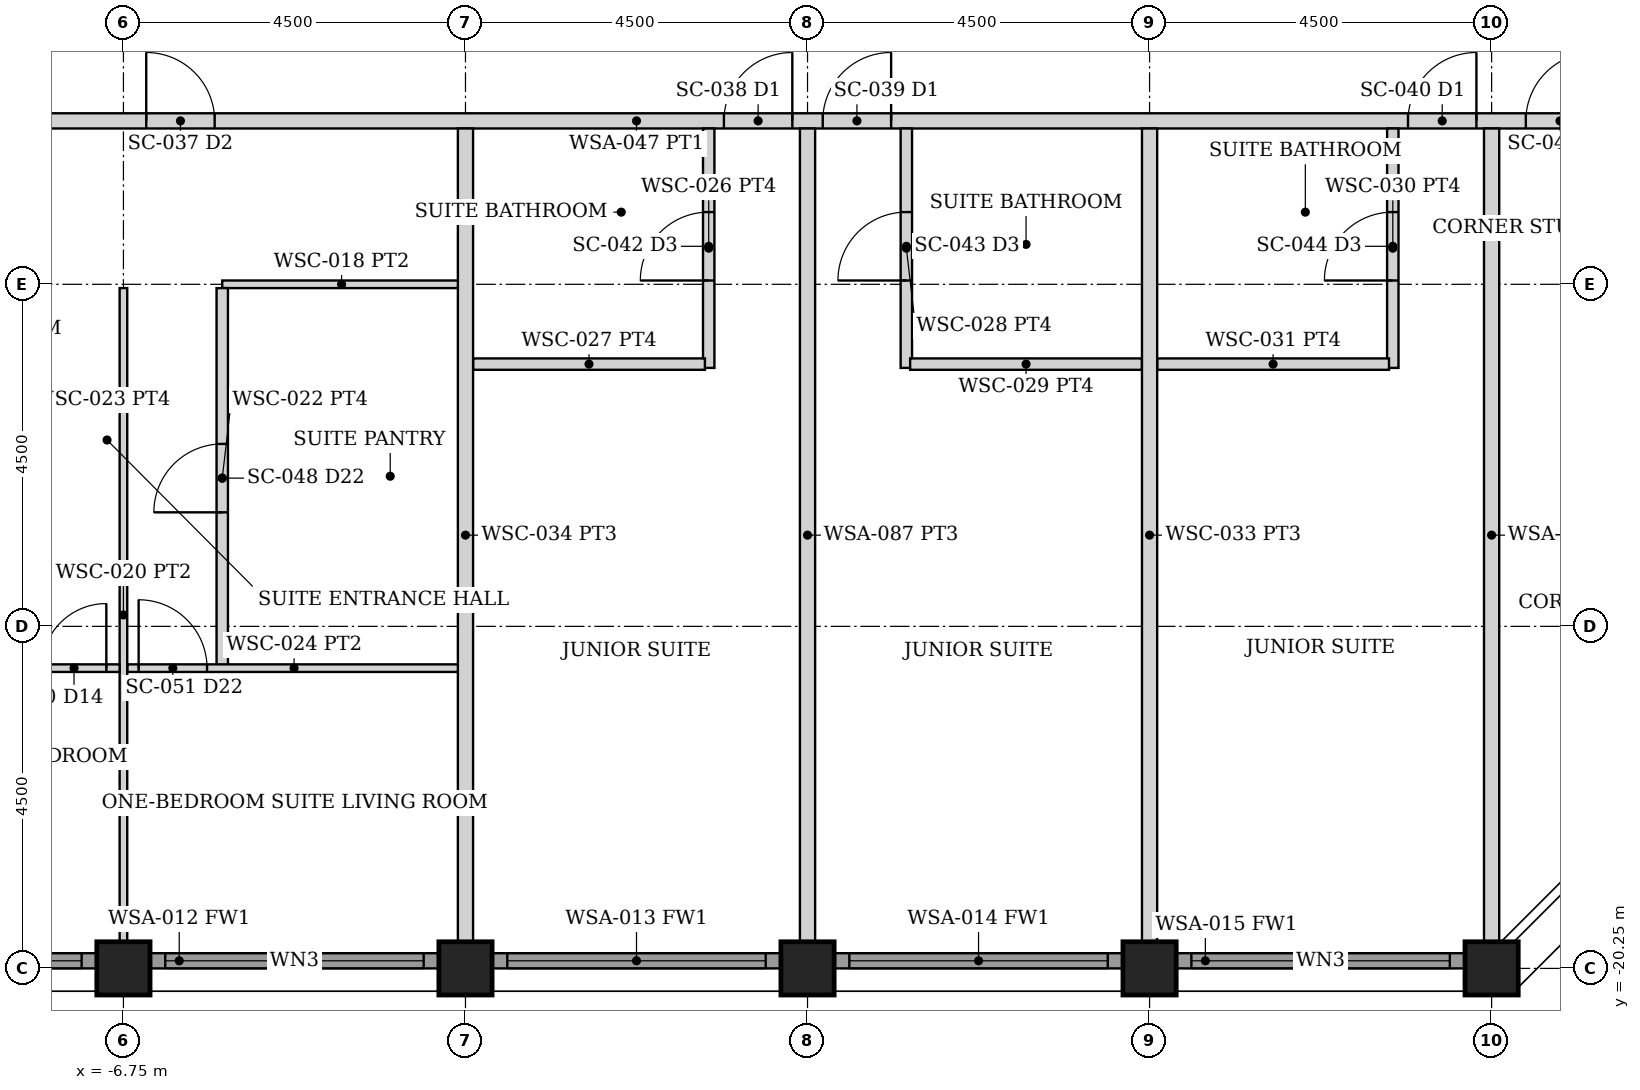
"""IFC4 building model, lengths in metres.
Left out: names, types, materials, properties, quantities, classifications, styles, units other than length and angle.
Written with IfcOpenShell. Run it as: python <this file> out.ifc"""

import sys

from ifc_helpers import new_model, si_unit, direction, frame, frame_2d, origin, origin_2d, place, context, subcontext, project, spatial, rectangle, hollow_rectangle, extrude, element, fill, save


model = new_model("IFC4")
c1 = context("Model", 3, precision=1e-05, world=origin(), true_north=direction((0.0, 1.0)))
c2 = subcontext(c1, "Body", "Model", "MODEL_VIEW")
j1 = project(units=[si_unit("LENGTHUNIT", "METRE"), si_unit("PLANEANGLEUNIT", "RADIAN")], contexts=[c1])
p1 = place(None, origin())
s1 = spatial("IfcSite", under=j1, at=p1, CompositionType="ELEMENT")
p2 = place(p1, origin())
s2 = spatial("IfcBuilding", under=s1, at=p2, CompositionType="ELEMENT")
p3 = place(p2, frame((0.0, 0.0, 223.3)))
s3 = spatial("IfcBuildingStorey", under=s2, at=p3, CompositionType="ELEMENT", Elevation=223.3)
for number, where, z_axis, x_axis in (
    (1, (-6.75, -20.25, 0.0), (0.0, 0.0, 1.0), (0.0, 1.0, 0.0)),
    (2, (-2.25, -20.25, 0.0), (0.0, 0.0, 1.0), (0.0, 1.0, 0.0)),
    (3, (2.25, -20.25, 0.0), (0.0, 0.0, 1.0), (0.0, 1.0, 0.0)),
    (4, (6.75, -20.25, 0.0), (0.0, 0.0, 1.0), (0.0, 1.0, 0.0)),
    (5, (11.25, -20.25, 0.0), (0.0, 0.0, 1.0), (0.0, 1.0, 0.0)),
):
    element("IfcColumn", number, at=place(p3, frame(where, z_axis=z_axis, x_axis=x_axis)), inside=s3, PredefinedType="COLUMN", context=c2, shape_type="SweptSolid", body=[
        extrude(hollow_rectangle(XDim=0.7, YDim=0.7, WallThickness=0.04, at=origin_2d()), origin(), (0.0, 0.0, 1.0), 3.75),
    ])
p4 = place(p3, frame((-10.895, -20.15, 0.0), z_axis=(0.0, 0.0, 1.0), x_axis=(1.0, 0.0, 0.0)))
e6 = element("IfcWall", 6, at=p4, inside=s3, PredefinedType="SOLIDWALL", context=c2, shape_type="SweptSolid", body=[
    extrude(rectangle(XDim=3.79, YDim=0.2, at=frame_2d((1.895, 0.0))), origin(), (0.0, 0.0, 1.0), 2.629),
])
p5 = place(p4, frame((0.195, 0.0, 0.3)))
e7 = element("IfcOpeningElement", 7, at=p5, cuts=e6, PredefinedType="OPENING", context=c2, shape_type="SweptSolid", body=[
    extrude(rectangle(XDim=3.4, YDim=2.179, at=frame_2d((1.7, 1.089))), frame((0.0, 0.11, 0.0), z_axis=(0.0, -1.0, 0.0), x_axis=(1.0, 0.0, 0.0)), (0.0, 0.0, 1.0), 0.22),
])
p6 = place(p3, frame((-6.395, -20.15, 0.0), z_axis=(0.0, 0.0, 1.0), x_axis=(1.0, 0.0, 0.0)))
e8 = element("IfcWall", 8, at=p6, inside=s3, PredefinedType="SOLIDWALL", context=c2, shape_type="SweptSolid", body=[
    extrude(rectangle(XDim=3.79, YDim=0.2, at=frame_2d((1.895, 0.0))), origin(), (0.0, 0.0, 1.0), 2.629),
])
p7 = place(p6, frame((0.195, 0.0, 0.3)))
e9 = element("IfcOpeningElement", 9, at=p7, cuts=e8, PredefinedType="OPENING", context=c2, shape_type="SweptSolid", body=[
    extrude(rectangle(XDim=3.4, YDim=2.179, at=frame_2d((1.7, 1.089))), frame((0.0, 0.11, 0.0), z_axis=(0.0, -1.0, 0.0), x_axis=(1.0, 0.0, 0.0)), (0.0, 0.0, 1.0), 0.22),
])
p8 = place(p3, frame((-1.895, -20.15, 0.0), z_axis=(0.0, 0.0, 1.0), x_axis=(1.0, 0.0, 0.0)))
e10 = element("IfcWall", 10, at=p8, inside=s3, PredefinedType="SOLIDWALL", context=c2, shape_type="SweptSolid", body=[
    extrude(rectangle(XDim=3.79, YDim=0.2, at=frame_2d((1.895, 0.0))), origin(), (0.0, 0.0, 1.0), 2.629),
])
p9 = place(p8, frame((0.195, 0.0, 0.3)))
e11 = element("IfcOpeningElement", 11, at=p9, cuts=e10, PredefinedType="OPENING", context=c2, shape_type="SweptSolid", body=[
    extrude(rectangle(XDim=3.4, YDim=2.179, at=frame_2d((1.7, 1.089))), frame((0.0, 0.11, 0.0), z_axis=(0.0, -1.0, 0.0), x_axis=(1.0, 0.0, 0.0)), (0.0, 0.0, 1.0), 0.22),
])
p10 = place(p3, frame((2.605, -20.15, 0.0), z_axis=(0.0, 0.0, 1.0), x_axis=(1.0, 0.0, 0.0)))
e12 = element("IfcWall", 12, at=p10, inside=s3, PredefinedType="SOLIDWALL", context=c2, shape_type="SweptSolid", body=[
    extrude(rectangle(XDim=3.79, YDim=0.2, at=frame_2d((1.895, 0.0))), origin(), (0.0, 0.0, 1.0), 2.629),
])
p11 = place(p10, frame((0.195, 0.0, 0.3)))
e13 = element("IfcOpeningElement", 13, at=p11, cuts=e12, PredefinedType="OPENING", context=c2, shape_type="SweptSolid", body=[
    extrude(rectangle(XDim=3.4, YDim=2.179, at=frame_2d((1.7, 1.089))), frame((0.0, 0.11, 0.0), z_axis=(0.0, -1.0, 0.0), x_axis=(1.0, 0.0, 0.0)), (0.0, 0.0, 1.0), 0.22),
])
p12 = place(p3, frame((7.105, -20.15, 0.0), z_axis=(0.0, 0.0, 1.0), x_axis=(1.0, 0.0, 0.0)))
e14 = element("IfcWall", 14, at=p12, inside=s3, PredefinedType="SOLIDWALL", context=c2, shape_type="SweptSolid", body=[
    extrude(rectangle(XDim=3.79, YDim=0.2, at=frame_2d((1.895, 0.0))), origin(), (0.0, 0.0, 1.0), 2.629),
])
p13 = place(p12, frame((0.195, 0.0, 0.3)))
e15 = element("IfcOpeningElement", 15, at=p13, cuts=e14, PredefinedType="OPENING", context=c2, shape_type="SweptSolid", body=[
    extrude(rectangle(XDim=3.4, YDim=2.179, at=frame_2d((1.7, 1.089))), frame((0.0, 0.11, 0.0), z_axis=(0.0, -1.0, 0.0), x_axis=(1.0, 0.0, 0.0)), (0.0, 0.0, 1.0), 0.22),
])
p14 = place(p3, frame((-20.05, -9.1, 0.0), z_axis=(0.0, 0.0, 1.0), x_axis=(1.0, 0.0, 0.0)))
e16 = element("IfcWall", 16, at=p14, inside=s3, PredefinedType="PARTITIONING", context=c2, shape_type="SweptSolid", body=[
    extrude(rectangle(XDim=40.1, YDim=0.2, at=frame_2d((20.05, 0.0))), origin(), (0.0, 0.0, 1.0), 2.629),
])
p15 = place(p14, frame((13.6, 0.0, 0.0)))
e17 = element("IfcOpeningElement", 17, at=p15, cuts=e16, PredefinedType="OPENING", context=c2, shape_type="SweptSolid", body=[
    extrude(rectangle(XDim=0.9, YDim=2.1, at=frame_2d((0.45, 1.05))), frame((0.0, 0.11, 0.0), z_axis=(0.0, -1.0, 0.0), x_axis=(1.0, 0.0, 0.0)), (0.0, 0.0, 1.0), 0.22),
])
p16 = place(p14, frame((21.2, 0.0, 0.0)))
e18 = element("IfcOpeningElement", 18, at=p16, cuts=e16, PredefinedType="OPENING", context=c2, shape_type="SweptSolid", body=[
    extrude(rectangle(XDim=0.9, YDim=2.1, at=frame_2d((0.45, 1.05))), frame((0.0, 0.11, 0.0), z_axis=(0.0, -1.0, 0.0), x_axis=(1.0, 0.0, 0.0)), (0.0, 0.0, 1.0), 0.22),
])
p17 = place(p14, frame((22.5, 0.0, 0.0)))
e19 = element("IfcOpeningElement", 19, at=p17, cuts=e16, PredefinedType="OPENING", context=c2, shape_type="SweptSolid", body=[
    extrude(rectangle(XDim=0.9, YDim=2.1, at=frame_2d((0.45, 1.05))), frame((0.0, 0.11, 0.0), z_axis=(0.0, -1.0, 0.0), x_axis=(1.0, 0.0, 0.0)), (0.0, 0.0, 1.0), 0.22),
])
p18 = place(p14, frame((30.2, 0.0, 0.0)))
e20 = element("IfcOpeningElement", 20, at=p18, cuts=e16, PredefinedType="OPENING", context=c2, shape_type="SweptSolid", body=[
    extrude(rectangle(XDim=0.9, YDim=2.1, at=frame_2d((0.45, 1.05))), frame((0.0, 0.11, 0.0), z_axis=(0.0, -1.0, 0.0), x_axis=(1.0, 0.0, 0.0)), (0.0, 0.0, 1.0), 0.22),
])
p19 = place(p14, frame((31.75, 0.0, 0.0)))
e21 = element("IfcOpeningElement", 21, at=p19, cuts=e16, PredefinedType="OPENING", context=c2, shape_type="SweptSolid", body=[
    extrude(rectangle(XDim=0.9, YDim=2.1, at=frame_2d((0.45, 1.05))), frame((0.0, 0.11, 0.0), z_axis=(0.0, -1.0, 0.0), x_axis=(1.0, 0.0, 0.0)), (0.0, 0.0, 1.0), 0.22),
])
p20 = place(p14, frame((7.45, 0.0, 0.0)))
e22 = element("IfcOpeningElement", 22, at=p20, cuts=e16, PredefinedType="OPENING", context=c2, shape_type="SweptSolid", body=[
    extrude(rectangle(XDim=0.9, YDim=2.1, at=frame_2d((0.45, 1.05))), frame((0.0, 0.11, 0.0), z_axis=(0.0, -1.0, 0.0), x_axis=(1.0, 0.0, 0.0)), (0.0, 0.0, 1.0), 0.22),
])
p21 = place(p3, frame((-5.45, -11.25, 0.0), z_axis=(0.0, 0.0, 1.0), x_axis=(1.0, 0.0, 0.0)))
e23 = element("IfcWall", 23, at=p21, inside=s3, PredefinedType="PARTITIONING", context=c2, shape_type="SweptSolid", body=[
    extrude(rectangle(XDim=3.14, YDim=0.1, at=frame_2d((1.57, 0.0))), origin(), (0.0, 0.0, 1.0), 2.629),
])
p22 = place(p3, frame((-5.45, -16.3, 0.0), z_axis=(0.0, 0.0, 1.0), x_axis=(0.0, 1.0, 0.0)))
e24 = element("IfcWall", 24, at=p22, inside=s3, PredefinedType="PARTITIONING", context=c2, shape_type="SweptSolid", body=[
    extrude(rectangle(XDim=5.0, YDim=0.15, at=frame_2d((2.5, 0.0))), origin(), (0.0, 0.0, 1.0), 2.629),
])
p23 = place(p22, frame((2.05, 0.0, 0.0)))
e25 = element("IfcOpeningElement", 25, at=p23, cuts=e24, PredefinedType="OPENING", context=c2, shape_type="SweptSolid", body=[
    extrude(rectangle(XDim=0.9, YDim=2.1, at=frame_2d((0.45, 1.05))), frame((0.0, 0.085, 0.0), z_axis=(0.0, -1.0, 0.0), x_axis=(1.0, 0.0, 0.0)), (0.0, 0.0, 1.0), 0.17),
])
p24 = place(p3, frame((-6.7, -16.3, 0.0), z_axis=(0.0, 0.0, 1.0), x_axis=(1.0, 0.0, 0.0)))
e26 = element("IfcWall", 26, at=p24, inside=s3, PredefinedType="PARTITIONING", context=c2, shape_type="SweptSolid", body=[
    extrude(rectangle(XDim=4.39, YDim=0.1, at=frame_2d((2.195, 0.0))), origin(), (0.0, 0.0, 1.0), 2.629),
])
p25 = place(p24, frame((0.15, 0.0, 0.0)))
e27 = element("IfcOpeningElement", 27, at=p25, cuts=e26, PredefinedType="OPENING", context=c2, shape_type="SweptSolid", body=[
    extrude(rectangle(XDim=0.9, YDim=2.1, at=frame_2d((0.45, 1.05))), frame((0.0, 0.06, 0.0), z_axis=(0.0, -1.0, 0.0), x_axis=(1.0, 0.0, 0.0)), (0.0, 0.0, 1.0), 0.12),
])
p26 = place(p3, frame((-6.75, -19.9, 0.0), z_axis=(0.0, 0.0, 1.0), x_axis=(0.0, 1.0, 0.0)))
e28 = element("IfcWall", 28, at=p26, inside=s3, PredefinedType="PARTITIONING", context=c2, shape_type="SweptSolid", body=[
    extrude(rectangle(XDim=8.6, YDim=0.1, at=frame_2d((4.3, 0.0))), origin(), (0.0, 0.0, 1.0), 2.629),
])
p27 = place(p3, frame((-11.19, -16.3, 0.0), z_axis=(0.0, 0.0, 1.0), x_axis=(1.0, 0.0, 0.0)))
e29 = element("IfcWall", 29, at=p27, inside=s3, PredefinedType="PARTITIONING", context=c2, shape_type="SweptSolid", body=[
    extrude(rectangle(XDim=4.39, YDim=0.1, at=frame_2d((2.195, 0.0))), origin(), (0.0, 0.0, 1.0), 2.629),
])
p28 = place(p27, frame((3.365, 0.0, 0.0)))
e30 = element("IfcOpeningElement", 30, at=p28, cuts=e29, PredefinedType="OPENING", context=c2, shape_type="SweptSolid", body=[
    extrude(rectangle(XDim=0.85, YDim=2.1, at=frame_2d((0.425, 1.05))), frame((0.0, 0.06, 0.0), z_axis=(0.0, -1.0, 0.0), x_axis=(1.0, 0.0, 0.0)), (0.0, 0.0, 1.0), 0.12),
])
p29 = place(p27, frame((1.08, 0.0, 0.0)))
e31 = element("IfcOpeningElement", 31, at=p29, cuts=e29, PredefinedType="OPENING", context=c2, shape_type="SweptSolid", body=[
    extrude(rectangle(XDim=0.9, YDim=2.1, at=frame_2d((0.45, 1.05))), frame((0.0, 0.06, 0.0), z_axis=(0.0, -1.0, 0.0), x_axis=(1.0, 0.0, 0.0)), (0.0, 0.0, 1.0), 0.12),
])
p30 = place(p3, frame((0.95, -12.35, 0.0), z_axis=(0.0, 0.0, 1.0), x_axis=(0.0, 1.0, 0.0)))
e32 = element("IfcWall", 32, at=p30, inside=s3, PredefinedType="PARTITIONING", context=c2, shape_type="SweptSolid", body=[
    extrude(rectangle(XDim=3.15, YDim=0.15, at=frame_2d((1.575, 0.0))), origin(), (0.0, 0.0, 1.0), 2.629),
])
p31 = place(p30, frame((1.15, 0.0, 0.0)))
e33 = element("IfcOpeningElement", 33, at=p31, cuts=e32, PredefinedType="OPENING", context=c2, shape_type="SweptSolid", body=[
    extrude(rectangle(XDim=0.9, YDim=2.1, at=frame_2d((0.45, 1.05))), frame((0.0, 0.085, 0.0), z_axis=(0.0, -1.0, 0.0), x_axis=(1.0, 0.0, 0.0)), (0.0, 0.0, 1.0), 0.17),
])
p32 = place(p3, frame((-2.15, -12.3, 0.0), z_axis=(0.0, 0.0, 1.0), x_axis=(1.0, 0.0, 0.0)))
e34 = element("IfcWall", 34, at=p32, inside=s3, PredefinedType="PARTITIONING", context=c2, shape_type="SweptSolid", body=[
    extrude(rectangle(XDim=3.05, YDim=0.15, at=frame_2d((1.525, 0.0))), origin(), (0.0, 0.0, 1.0), 2.629),
])
p33 = place(p3, frame((3.55, -12.35, 0.0), z_axis=(0.0, 0.0, 1.0), x_axis=(0.0, 1.0, 0.0)))
e35 = element("IfcWall", 35, at=p33, inside=s3, PredefinedType="PARTITIONING", context=c2, shape_type="SweptSolid", body=[
    extrude(rectangle(XDim=3.15, YDim=0.15, at=frame_2d((1.575, 0.0))), origin(), (0.0, 0.0, 1.0), 2.629),
])
p34 = place(p33, frame((1.15, 0.0, 0.0)))
e36 = element("IfcOpeningElement", 36, at=p34, cuts=e35, PredefinedType="OPENING", context=c2, shape_type="SweptSolid", body=[
    extrude(rectangle(XDim=0.9, YDim=2.1, at=frame_2d((0.45, 1.05))), frame((0.0, 0.085, 0.0), z_axis=(0.0, -1.0, 0.0), x_axis=(1.0, 0.0, 0.0)), (0.0, 0.0, 1.0), 0.17),
])
p35 = place(p3, frame((3.6, -12.3, 0.0), z_axis=(0.0, 0.0, 1.0), x_axis=(1.0, 0.0, 0.0)))
e37 = element("IfcWall", 37, at=p35, inside=s3, PredefinedType="PARTITIONING", context=c2, shape_type="SweptSolid", body=[
    extrude(rectangle(XDim=3.05, YDim=0.15, at=frame_2d((1.525, 0.0))), origin(), (0.0, 0.0, 1.0), 2.629),
])
p36 = place(p3, frame((9.95, -12.35, 0.0), z_axis=(0.0, 0.0, 1.0), x_axis=(0.0, 1.0, 0.0)))
e38 = element("IfcWall", 38, at=p36, inside=s3, PredefinedType="PARTITIONING", context=c2, shape_type="SweptSolid", body=[
    extrude(rectangle(XDim=3.15, YDim=0.15, at=frame_2d((1.575, 0.0))), origin(), (0.0, 0.0, 1.0), 2.629),
])
p37 = place(p36, frame((1.15, 0.0, 0.0)))
e39 = element("IfcOpeningElement", 39, at=p37, cuts=e38, PredefinedType="OPENING", context=c2, shape_type="SweptSolid", body=[
    extrude(rectangle(XDim=0.9, YDim=2.1, at=frame_2d((0.45, 1.05))), frame((0.0, 0.085, 0.0), z_axis=(0.0, -1.0, 0.0), x_axis=(1.0, 0.0, 0.0)), (0.0, 0.0, 1.0), 0.17),
])
p38 = place(p3, frame((6.85, -12.3, 0.0), z_axis=(0.0, 0.0, 1.0), x_axis=(1.0, 0.0, 0.0)))
e40 = element("IfcWall", 40, at=p38, inside=s3, PredefinedType="PARTITIONING", context=c2, shape_type="SweptSolid", body=[
    extrude(rectangle(XDim=3.05, YDim=0.15, at=frame_2d((1.525, 0.0))), origin(), (0.0, 0.0, 1.0), 2.629),
])
for number, where, z_axis, x_axis in (
    (41, (-2.25, -19.9, 0.0), (0.0, 0.0, 1.0), (0.0, 1.0, 0.0)),
    (42, (2.25, -19.9, 0.0), (0.0, 0.0, 1.0), (0.0, 1.0, 0.0)),
    (43, (6.75, -19.9, 0.0), (0.0, 0.0, 1.0), (0.0, 1.0, 0.0)),
    (44, (11.25, -19.9, 0.0), (0.0, 0.0, 1.0), (0.0, 1.0, 0.0)),
):
    element("IfcWall", number, at=place(p3, frame(where, z_axis=z_axis, x_axis=x_axis)), inside=s3, PredefinedType="PARTITIONING", context=c2, shape_type="SweptSolid", body=[
        extrude(rectangle(XDim=10.7, YDim=0.2, at=frame_2d((5.35, 0.0))), origin(), (0.0, 0.0, 1.0), 2.629),
    ])
p39 = place(p5, origin())
e45 = element("IfcWindow", 45, at=p39, inside=s3, PartitioningType="SINGLE_PANEL", PredefinedType="WINDOW", context=c2, shape_type="SweptSolid", body=[
    extrude(rectangle(XDim=3.4, YDim=2.179, at=frame_2d((1.7, 1.089))), frame((0.0, 0.03, 0.0), z_axis=(0.0, -1.0, 0.0), x_axis=(1.0, 0.0, 0.0)), (0.0, 0.0, 1.0), 0.06),
])
fill(e7, e45)
p40 = place(p7, origin())
e46 = element("IfcWindow", 46, at=p40, inside=s3, PartitioningType="SINGLE_PANEL", PredefinedType="WINDOW", context=c2, shape_type="SweptSolid", body=[
    extrude(rectangle(XDim=3.4, YDim=2.179, at=frame_2d((1.7, 1.089))), frame((0.0, 0.03, 0.0), z_axis=(0.0, -1.0, 0.0), x_axis=(1.0, 0.0, 0.0)), (0.0, 0.0, 1.0), 0.06),
])
fill(e9, e46)
p41 = place(p9, origin())
e47 = element("IfcWindow", 47, at=p41, inside=s3, PartitioningType="SINGLE_PANEL", PredefinedType="WINDOW", context=c2, shape_type="SweptSolid", body=[
    extrude(rectangle(XDim=3.4, YDim=2.179, at=frame_2d((1.7, 1.089))), frame((0.0, 0.03, 0.0), z_axis=(0.0, -1.0, 0.0), x_axis=(1.0, 0.0, 0.0)), (0.0, 0.0, 1.0), 0.06),
])
fill(e11, e47)
p42 = place(p11, origin())
e48 = element("IfcWindow", 48, at=p42, inside=s3, PartitioningType="SINGLE_PANEL", PredefinedType="WINDOW", context=c2, shape_type="SweptSolid", body=[
    extrude(rectangle(XDim=3.4, YDim=2.179, at=frame_2d((1.7, 1.089))), frame((0.0, 0.03, 0.0), z_axis=(0.0, -1.0, 0.0), x_axis=(1.0, 0.0, 0.0)), (0.0, 0.0, 1.0), 0.06),
])
fill(e13, e48)
p43 = place(p13, origin())
e49 = element("IfcWindow", 49, at=p43, inside=s3, PartitioningType="SINGLE_PANEL", PredefinedType="WINDOW", context=c2, shape_type="SweptSolid", body=[
    extrude(rectangle(XDim=3.4, YDim=2.179, at=frame_2d((1.7, 1.089))), frame((0.0, 0.03, 0.0), z_axis=(0.0, -1.0, 0.0), x_axis=(1.0, 0.0, 0.0)), (0.0, 0.0, 1.0), 0.06),
])
fill(e15, e49)
p44 = place(p15, origin())
e50 = element("IfcDoor", 50, at=p44, inside=s3, OperationType="SINGLE_SWING_LEFT", PredefinedType="DOOR", context=c2, shape_type="SweptSolid", body=[
    extrude(rectangle(XDim=0.9, YDim=2.1, at=frame_2d((0.45, 1.05))), frame((0.0, 0.025, 0.0), z_axis=(0.0, -1.0, 0.0), x_axis=(1.0, 0.0, 0.0)), (0.0, 0.0, 1.0), 0.05),
])
fill(e17, e50)
p45 = place(p23, origin())
e51 = element("IfcDoor", 51, at=p45, inside=s3, OperationType="SINGLE_SWING_LEFT", PredefinedType="DOOR", context=c2, shape_type="SweptSolid", body=[
    extrude(rectangle(XDim=0.9, YDim=2.1, at=frame_2d((0.45, 1.05))), frame((0.0, 0.025, 0.0), z_axis=(0.0, -1.0, 0.0), x_axis=(1.0, 0.0, 0.0)), (0.0, 0.0, 1.0), 0.05),
])
fill(e25, e51)
p46 = place(p25, origin())
e52 = element("IfcDoor", 52, at=p46, inside=s3, OperationType="SINGLE_SWING_LEFT", PredefinedType="DOOR", context=c2, shape_type="SweptSolid", body=[
    extrude(rectangle(XDim=0.9, YDim=2.1, at=frame_2d((0.45, 1.05))), frame((0.0, 0.025, 0.0), z_axis=(0.0, -1.0, 0.0), x_axis=(1.0, 0.0, 0.0)), (0.0, 0.0, 1.0), 0.05),
])
fill(e27, e52)
p47 = place(p28, origin())
e53 = element("IfcDoor", 53, at=p47, inside=s3, OperationType="SINGLE_SWING_RIGHT", PredefinedType="DOOR", context=c2, shape_type="SweptSolid", body=[
    extrude(rectangle(XDim=0.85, YDim=2.1, at=frame_2d((0.425, 1.05))), frame((0.0, 0.025, 0.0), z_axis=(0.0, -1.0, 0.0), x_axis=(1.0, 0.0, 0.0)), (0.0, 0.0, 1.0), 0.05),
])
fill(e30, e53)
p48 = place(p16, origin())
e54 = element("IfcDoor", 54, at=p48, inside=s3, OperationType="SINGLE_SWING_RIGHT", PredefinedType="DOOR", context=c2, shape_type="SweptSolid", body=[
    extrude(rectangle(XDim=0.9, YDim=2.1, at=frame_2d((0.45, 1.05))), frame((0.0, 0.025, 0.0), z_axis=(0.0, -1.0, 0.0), x_axis=(1.0, 0.0, 0.0)), (0.0, 0.0, 1.0), 0.05),
])
fill(e18, e54)
p49 = place(p31, origin())
e55 = element("IfcDoor", 55, at=p49, inside=s3, OperationType="SINGLE_SWING_LEFT", PredefinedType="DOOR", context=c2, shape_type="SweptSolid", body=[
    extrude(rectangle(XDim=0.9, YDim=2.1, at=frame_2d((0.45, 1.05))), frame((0.0, 0.025, 0.0), z_axis=(0.0, -1.0, 0.0), x_axis=(1.0, 0.0, 0.0)), (0.0, 0.0, 1.0), 0.05),
])
fill(e33, e55)
p50 = place(p17, origin())
e56 = element("IfcDoor", 56, at=p50, inside=s3, OperationType="SINGLE_SWING_RIGHT", PredefinedType="DOOR", context=c2, shape_type="SweptSolid", body=[
    extrude(rectangle(XDim=0.9, YDim=2.1, at=frame_2d((0.45, 1.05))), frame((0.0, 0.025, 0.0), z_axis=(0.0, -1.0, 0.0), x_axis=(1.0, 0.0, 0.0)), (0.0, 0.0, 1.0), 0.05),
])
fill(e19, e56)
p51 = place(p34, origin())
e57 = element("IfcDoor", 57, at=p51, inside=s3, OperationType="SINGLE_SWING_LEFT", PredefinedType="DOOR", context=c2, shape_type="SweptSolid", body=[
    extrude(rectangle(XDim=0.9, YDim=2.1, at=frame_2d((0.45, 1.05))), frame((0.0, 0.025, 0.0), z_axis=(0.0, -1.0, 0.0), x_axis=(1.0, 0.0, 0.0)), (0.0, 0.0, 1.0), 0.05),
])
fill(e36, e57)
p52 = place(p18, origin())
e58 = element("IfcDoor", 58, at=p52, inside=s3, OperationType="SINGLE_SWING_RIGHT", PredefinedType="DOOR", context=c2, shape_type="SweptSolid", body=[
    extrude(rectangle(XDim=0.9, YDim=2.1, at=frame_2d((0.45, 1.05))), frame((0.0, 0.025, 0.0), z_axis=(0.0, -1.0, 0.0), x_axis=(1.0, 0.0, 0.0)), (0.0, 0.0, 1.0), 0.05),
])
fill(e20, e58)
p53 = place(p37, origin())
e59 = element("IfcDoor", 59, at=p53, inside=s3, OperationType="SINGLE_SWING_LEFT", PredefinedType="DOOR", context=c2, shape_type="SweptSolid", body=[
    extrude(rectangle(XDim=0.9, YDim=2.1, at=frame_2d((0.45, 1.05))), frame((0.0, 0.025, 0.0), z_axis=(0.0, -1.0, 0.0), x_axis=(1.0, 0.0, 0.0)), (0.0, 0.0, 1.0), 0.05),
])
fill(e39, e59)
p54 = place(p19, origin())
e60 = element("IfcDoor", 60, at=p54, inside=s3, OperationType="SINGLE_SWING_RIGHT", PredefinedType="DOOR", context=c2, shape_type="SweptSolid", body=[
    extrude(rectangle(XDim=0.9, YDim=2.1, at=frame_2d((0.45, 1.05))), frame((0.0, 0.025, 0.0), z_axis=(0.0, -1.0, 0.0), x_axis=(1.0, 0.0, 0.0)), (0.0, 0.0, 1.0), 0.05),
])
fill(e21, e60)
save(model, sys.argv[1])
